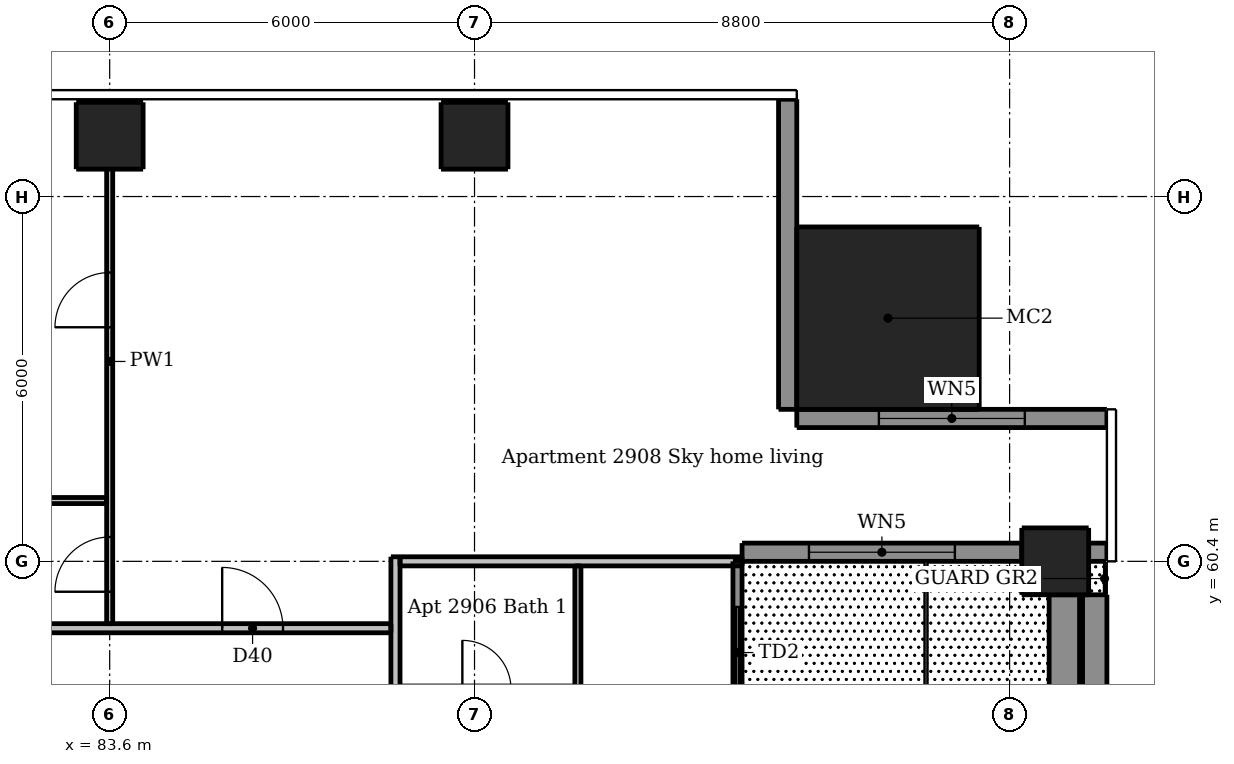
"""IFC4 building model, lengths in metres.
Left out: names, types, materials, properties, quantities, classifications, styles, units other than length and angle.
Written with IfcOpenShell. Run it as: python <this file> out.ifc"""

import sys

from ifc_helpers import new_model, si_unit, direction, frame, frame_2d, origin, origin_2d, place, context, subcontext, project, spatial, rectangle, extrude, element, fill, save


model = new_model("IFC4")
c1 = context("Model", 3, precision=1e-05, world=origin(), true_north=direction((0.0, 1.0)))
c2 = subcontext(c1, "Body", "Model", "MODEL_VIEW")
j1 = project(units=[si_unit("LENGTHUNIT", "METRE"), si_unit("PLANEANGLEUNIT", "RADIAN")], contexts=[c1])
p1 = place(None, origin())
s1 = spatial("IfcSite", under=j1, at=p1, CompositionType="ELEMENT")
p2 = place(p1, origin())
s2 = spatial("IfcBuilding", under=s1, at=p2, CompositionType="ELEMENT")
p3 = place(p2, frame((0.0, 0.0, 108.4)))
s3 = spatial("IfcBuildingStorey", under=s2, at=p3, CompositionType="ELEMENT", Elevation=108.4)
for number, where, z_axis, x_axis in (
    (1, (99.15, 60.4, 0.0), (0.0, 0.0, 1.0), (1.0, 0.0, 0.0)),
    (2, (83.6, 67.4, 0.0), (0.0, 0.0, 1.0), (1.0, 0.0, 0.0)),
    (3, (89.6, 67.4, 0.0), (0.0, 0.0, 1.0), (1.0, 0.0, 0.0)),
):
    element("IfcColumn", number, at=place(p3, frame(where, z_axis=z_axis, x_axis=x_axis)), inside=s3, PredefinedType="COLUMN", context=c2, shape_type="SweptSolid", body=[
        extrude(rectangle(XDim=1.1, YDim=1.1, at=origin_2d()), origin(), (0.0, 0.0, 1.0), 3.05),
    ])
p4 = place(p3, frame((96.4, 64.4, 0.0), z_axis=(0.0, 0.0, 1.0), x_axis=(1.0, 0.0, 0.0)))
e4 = element("IfcColumn", 4, at=p4, inside=s3, PredefinedType="COLUMN", context=c2, shape_type="SweptSolid", body=[
    extrude(rectangle(XDim=3.0, YDim=3.0, at=origin_2d()), origin(), (0.0, 0.0, 1.0), 3.3),
])
p5 = place(p3, frame((94.0, 60.55, 0.0), z_axis=(0.0, 0.0, 1.0), x_axis=(1.0, 0.0, 0.0)))
e5 = element("IfcWall", 5, at=p5, inside=s3, PredefinedType="SOLIDWALL", context=c2, shape_type="SweptSolid", body=[
    extrude(rectangle(XDim=4.6, YDim=0.3, at=frame_2d((2.3, 0.0))), origin(), (0.0, 0.0, 1.0), 3.05),
])
p6 = place(p5, frame((1.1, 0.0, 0.15)))
e6 = element("IfcOpeningElement", 6, at=p6, cuts=e5, PredefinedType="OPENING", context=c2, shape_type="SweptSolid", body=[
    extrude(rectangle(XDim=2.4, YDim=2.1, at=frame_2d((1.2, 1.05))), frame((0.0, 0.16, 0.0), z_axis=(0.0, -1.0, 0.0), x_axis=(1.0, 0.0, 0.0)), (0.0, 0.0, 1.0), 0.32),
])
p7 = place(p3, frame((99.7, 60.55, 0.0), z_axis=(0.0, 0.0, 1.0), x_axis=(1.0, 0.0, 0.0)))
e7 = element("IfcWall", 7, at=p7, inside=s3, PredefinedType="SOLIDWALL", context=c2, shape_type="SweptSolid", body=[
    extrude(rectangle(XDim=0.3, YDim=0.3, at=frame_2d((0.15, 0.0))), origin(), (0.0, 0.0, 1.0), 3.05),
])
p8 = place(p3, frame((100.0, 62.75, 0.0), z_axis=(0.0, 0.0, 1.0), x_axis=(-1.0, 0.0, 0.0)))
e8 = element("IfcWall", 8, at=p8, inside=s3, PredefinedType="SOLIDWALL", context=c2, shape_type="SweptSolid", body=[
    extrude(rectangle(XDim=5.1, YDim=0.3, at=frame_2d((2.55, 0.0))), origin(), (0.0, 0.0, 1.0), 3.05),
])
p9 = place(p8, frame((1.35, 0.0, 0.15)))
e9 = element("IfcOpeningElement", 9, at=p9, cuts=e8, PredefinedType="OPENING", context=c2, shape_type="SweptSolid", body=[
    extrude(rectangle(XDim=2.4, YDim=2.1, at=frame_2d((1.2, 1.05))), frame((0.0, 0.16, 0.0), z_axis=(0.0, -1.0, 0.0), x_axis=(1.0, 0.0, 0.0)), (0.0, 0.0, 1.0), 0.32),
])
p10 = place(p3, frame((94.75, 62.9, 0.0), z_axis=(0.0, 0.0, 1.0), x_axis=(0.0, 1.0, 0.0)))
e10 = element("IfcWall", 10, at=p10, inside=s3, PredefinedType="SOLIDWALL", context=c2, shape_type="SweptSolid", body=[
    extrude(rectangle(XDim=5.1, YDim=0.3, at=frame_2d((2.55, 0.0))), origin(), (0.0, 0.0, 1.0), 3.05),
])
p11 = place(p3, frame((93.925, 57.4, 0.0), z_axis=(0.0, 0.0, 1.0), x_axis=(0.0, 1.0, 0.0)))
e11 = element("IfcWall", 11, at=p11, inside=s3, PredefinedType="SOLIDWALL", context=c2, shape_type="SweptSolid", body=[
    extrude(rectangle(XDim=3.0, YDim=0.15, at=frame_2d((1.5, 0.0))), origin(), (0.0, 0.0, 1.0), 3.05),
])
p12 = place(p11, frame((0.75, 0.0, 0.0)))
e12 = element("IfcOpeningElement", 12, at=p12, cuts=e11, PredefinedType="OPENING", context=c2, shape_type="SweptSolid", body=[
    extrude(rectangle(XDim=1.5, YDim=2.4, at=frame_2d((0.75, 1.2))), frame((0.0, 0.085, 0.0), z_axis=(0.0, -1.0, 0.0), x_axis=(1.0, 0.0, 0.0)), (0.0, 0.0, 1.0), 0.17),
])
p13 = place(p3, frame((99.8, 54.4, 0.03), z_axis=(0.0, 0.0, 1.0), x_axis=(0.0, 1.0, 0.0)))
e13 = element("IfcWall", 13, at=p13, inside=s3, PredefinedType="PARAPET", context=c2, shape_type="SweptSolid", body=[
    extrude(rectangle(XDim=5.45, YDim=0.4, at=frame_2d((2.725, 0.0))), origin(), (0.0, 0.0, 1.0), 1.1),
])
p14 = place(p3, frame((99.3, 54.95, 0.03), z_axis=(0.0, 0.0, 1.0), x_axis=(0.0, 1.0, 0.0)))
e14 = element("IfcWall", 14, at=p14, inside=s3, PredefinedType="SOLIDWALL", context=c2, shape_type="SweptSolid", body=[
    extrude(rectangle(XDim=4.9, YDim=0.5, at=frame_2d((2.45, 0.0))), origin(), (0.0, 0.0, 1.0), 0.6),
])
p15 = place(p3, frame((83.6, 59.375, 0.0), z_axis=(0.0, 0.0, 1.0), x_axis=(0.0, 1.0, 0.0)))
e15 = element("IfcWall", 15, at=p15, inside=s3, PredefinedType="PARTITIONING", context=c2, shape_type="SweptSolid", body=[
    extrude(rectangle(XDim=8.625, YDim=0.1, at=frame_2d((4.312, 0.0))), origin(), (0.0, 0.0, 1.0), 2.516),
])
p16 = place(p15, frame((0.525, 0.0, 0.0)))
e16 = element("IfcOpeningElement", 16, at=p16, cuts=e15, PredefinedType="OPENING", context=c2, shape_type="SweptSolid", body=[
    extrude(rectangle(XDim=0.9, YDim=2.1, at=frame_2d((0.45, 1.05))), frame((0.0, 0.06, 0.0), z_axis=(0.0, -1.0, 0.0), x_axis=(1.0, 0.0, 0.0)), (0.0, 0.0, 1.0), 0.12),
])
p17 = place(p15, frame((4.875, 0.0, 0.0)))
e17 = element("IfcOpeningElement", 17, at=p17, cuts=e15, PredefinedType="OPENING", context=c2, shape_type="SweptSolid", body=[
    extrude(rectangle(XDim=0.9, YDim=2.1, at=frame_2d((0.45, 1.05))), frame((0.0, 0.06, 0.0), z_axis=(0.0, -1.0, 0.0), x_axis=(1.0, 0.0, 0.0)), (0.0, 0.0, 1.0), 0.12),
])
p18 = place(p3, frame((91.3, 58.25, 0.0), z_axis=(0.0, 0.0, 1.0), x_axis=(0.0, 1.0, 0.0)))
e18 = element("IfcWall", 18, at=p18, inside=s3, PredefinedType="PARTITIONING", context=c2, shape_type="SweptSolid", body=[
    extrude(rectangle(XDim=2.075, YDim=0.1, at=frame_2d((1.038, 0.0))), origin(), (0.0, 0.0, 1.0), 3.05),
])
p19 = place(p3, frame((83.55, 61.4, 0.0), z_axis=(0.0, 0.0, 1.0), x_axis=(-1.0, 0.0, 0.0)))
e19 = element("IfcWall", 19, at=p19, inside=s3, PredefinedType="PARTITIONING", context=c2, shape_type="SweptSolid", body=[
    extrude(rectangle(XDim=5.875, YDim=0.1, at=frame_2d((2.938, 0.0))), origin(), (0.0, 0.0, 1.0), 3.05),
])
p20 = place(p19, frame((3.75, 0.0, 0.0)))
e20 = element("IfcOpeningElement", 20, at=p20, cuts=e19, PredefinedType="OPENING", context=c2, shape_type="SweptSolid", body=[
    extrude(rectangle(XDim=0.8, YDim=2.1, at=frame_2d((0.4, 1.05))), frame((0.0, 0.06, 0.0), z_axis=(0.0, -1.0, 0.0), x_axis=(1.0, 0.0, 0.0)), (0.0, 0.0, 1.0), 0.12),
])
p21 = place(p3, frame((88.3, 60.475, 0.0), z_axis=(0.0, 0.0, 1.0), x_axis=(0.0, -1.0, 0.0)))
e21 = element("IfcWall", 21, at=p21, inside=s3, PredefinedType="PARTITIONING", context=c2, shape_type="SweptSolid", body=[
    extrude(rectangle(XDim=28.7, YDim=0.15, at=frame_2d((14.35, 0.0))), origin(), (0.0, 0.0, 1.0), 3.05),
])
p22 = place(p21, frame((27.425, 0.0, 0.0)))
e22 = element("IfcOpeningElement", 22, at=p22, cuts=e21, PredefinedType="OPENING", context=c2, shape_type="SweptSolid", body=[
    extrude(rectangle(XDim=1.0, YDim=2.1, at=frame_2d((0.5, 1.05))), frame((0.0, 0.085, 0.0), z_axis=(0.0, -1.0, 0.0), x_axis=(1.0, 0.0, 0.0)), (0.0, 0.0, 1.0), 0.17),
])
p23 = place(p21, frame((14.575, 0.0, 0.0)))
e23 = element("IfcOpeningElement", 23, at=p23, cuts=e21, PredefinedType="OPENING", context=c2, shape_type="SweptSolid", body=[
    extrude(rectangle(XDim=1.0, YDim=2.1, at=frame_2d((0.5, 1.05))), frame((0.0, 0.085, 0.0), z_axis=(0.0, -1.0, 0.0), x_axis=(1.0, 0.0, 0.0)), (0.0, 0.0, 1.0), 0.17),
])
p24 = place(p21, frame((2.575, 0.0, 0.0)))
e24 = element("IfcOpeningElement", 24, at=p24, cuts=e21, PredefinedType="OPENING", context=c2, shape_type="SweptSolid", body=[
    extrude(rectangle(XDim=1.0, YDim=2.1, at=frame_2d((0.5, 1.05))), frame((0.0, 0.085, 0.0), z_axis=(0.0, -1.0, 0.0), x_axis=(1.0, 0.0, 0.0)), (0.0, 0.0, 1.0), 0.17),
])
p25 = place(p3, frame((88.375, 60.4, 0.0), z_axis=(0.0, 0.0, 1.0), x_axis=(1.0, 0.0, 0.0)))
e25 = element("IfcWall", 25, at=p25, inside=s3, PredefinedType="PARTITIONING", context=c2, shape_type="SweptSolid", body=[
    extrude(rectangle(XDim=5.625, YDim=0.15, at=frame_2d((2.812, 0.0))), origin(), (0.0, 0.0, 1.0), 2.516),
])
p26 = place(p3, frame((59.675, 59.3, 0.0), z_axis=(0.0, 0.0, 1.0), x_axis=(1.0, 0.0, 0.0)))
e26 = element("IfcWall", 26, at=p26, inside=s3, PredefinedType="PARTITIONING", context=c2, shape_type="SweptSolid", body=[
    extrude(rectangle(XDim=28.55, YDim=0.15, at=frame_2d((14.275, 0.0))), origin(), (0.0, 0.0, 1.0), 3.05),
])
p27 = place(p26, frame((8.975, 0.0, 0.0)))
e27 = element("IfcOpeningElement", 27, at=p27, cuts=e26, PredefinedType="OPENING", context=c2, shape_type="SweptSolid", body=[
    extrude(rectangle(XDim=1.0, YDim=2.1, at=frame_2d((0.5, 1.05))), frame((0.0, 0.085, 0.0), z_axis=(0.0, -1.0, 0.0), x_axis=(1.0, 0.0, 0.0)), (0.0, 0.0, 1.0), 0.17),
])
p28 = place(p26, frame((25.775, 0.0, 0.0)))
e28 = element("IfcOpeningElement", 28, at=p28, cuts=e26, PredefinedType="OPENING", context=c2, shape_type="SweptSolid", body=[
    extrude(rectangle(XDim=1.0, YDim=2.1, at=frame_2d((0.5, 1.05))), frame((0.0, 0.085, 0.0), z_axis=(0.0, -1.0, 0.0), x_axis=(1.0, 0.0, 0.0)), (0.0, 0.0, 1.0), 0.17),
])
p29 = place(p6, origin())
e29 = element("IfcWindow", 29, at=p29, inside=s3, PartitioningType="DOUBLE_PANEL_VERTICAL", PredefinedType="WINDOW", context=c2, shape_type="SweptSolid", body=[
    extrude(rectangle(XDim=2.4, YDim=2.1, at=frame_2d((1.2, 1.05))), frame((0.0, 0.03, 0.0), z_axis=(0.0, -1.0, 0.0), x_axis=(1.0, 0.0, 0.0)), (0.0, 0.0, 1.0), 0.06),
])
fill(e6, e29)
p30 = place(p9, origin())
e30 = element("IfcWindow", 30, at=p30, inside=s3, PartitioningType="DOUBLE_PANEL_VERTICAL", PredefinedType="WINDOW", context=c2, shape_type="SweptSolid", body=[
    extrude(rectangle(XDim=2.4, YDim=2.1, at=frame_2d((1.2, 1.05))), frame((0.0, 0.03, 0.0), z_axis=(0.0, -1.0, 0.0), x_axis=(1.0, 0.0, 0.0)), (0.0, 0.0, 1.0), 0.06),
])
fill(e9, e30)
p31 = place(p12, origin())
e31 = element("IfcDoor", 31, at=p31, inside=s3, OperationType="DOUBLE_DOOR_SLIDING", PredefinedType="DOOR", context=c2, shape_type="SweptSolid", body=[
    extrude(rectangle(XDim=1.5, YDim=2.4, at=frame_2d((0.75, 1.2))), frame((0.0, 0.025, 0.0), z_axis=(0.0, -1.0, 0.0), x_axis=(1.0, 0.0, 0.0)), (0.0, 0.0, 1.0), 0.05),
])
fill(e12, e31)
p32 = place(p28, origin())
e32 = element("IfcDoor", 32, at=p32, inside=s3, OperationType="SINGLE_SWING_LEFT", PredefinedType="DOOR", context=c2, shape_type="SweptSolid", body=[
    extrude(rectangle(XDim=1.0, YDim=2.1, at=frame_2d((0.5, 1.05))), frame((0.0, 0.025, 0.0), z_axis=(0.0, -1.0, 0.0), x_axis=(1.0, 0.0, 0.0)), (0.0, 0.0, 1.0), 0.05),
])
fill(e28, e32)
p33 = place(p16, origin())
e33 = element("IfcDoor", 33, at=p33, inside=s3, OperationType="SINGLE_SWING_LEFT", PredefinedType="DOOR", context=c2, shape_type="SweptSolid", body=[
    extrude(rectangle(XDim=0.9, YDim=2.1, at=frame_2d((0.45, 1.05))), frame((0.0, 0.025, 0.0), z_axis=(0.0, -1.0, 0.0), x_axis=(1.0, 0.0, 0.0)), (0.0, 0.0, 1.0), 0.05),
])
fill(e16, e33)
p34 = place(p17, origin())
e34 = element("IfcDoor", 34, at=p34, inside=s3, OperationType="SINGLE_SWING_LEFT", PredefinedType="DOOR", context=c2, shape_type="SweptSolid", body=[
    extrude(rectangle(XDim=0.9, YDim=2.1, at=frame_2d((0.45, 1.05))), frame((0.0, 0.025, 0.0), z_axis=(0.0, -1.0, 0.0), x_axis=(1.0, 0.0, 0.0)), (0.0, 0.0, 1.0), 0.05),
])
fill(e17, e34)
save(model, sys.argv[1])
